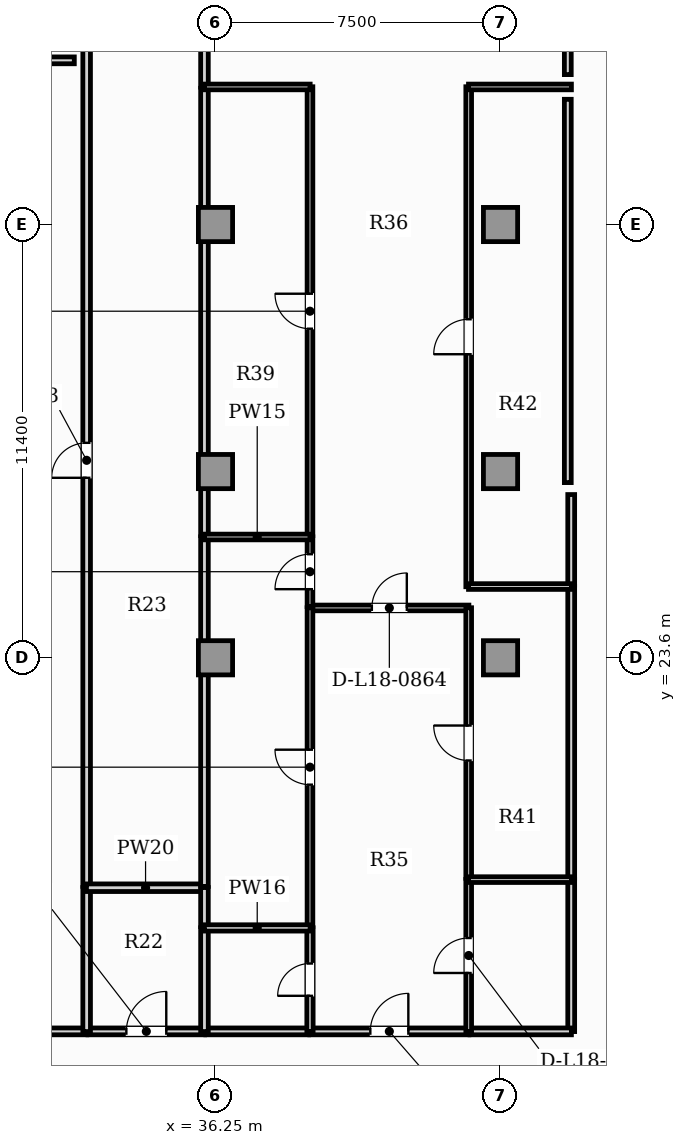
"""IFC4 building model, lengths in metres.
Left out: names, types, materials, properties, quantities, classifications, styles, units other than length and angle.
Written with IfcOpenShell. Run it as: python <this file> out.ifc"""

import sys

from ifc_helpers import new_model, si_unit, direction, frame, frame_2d, origin, origin_2d, place, context, subcontext, project, spatial, rectangle, extrude, element, fill, save


model = new_model("IFC4")
c1 = context("Model", 3, precision=1e-05, world=origin(), true_north=direction((0.0, 1.0)))
c2 = subcontext(c1, "Body", "Model", "MODEL_VIEW")
j1 = project(units=[si_unit("LENGTHUNIT", "METRE"), si_unit("PLANEANGLEUNIT", "RADIAN")], contexts=[c1])
p1 = place(None, origin())
s1 = spatial("IfcSite", under=j1, at=p1, CompositionType="ELEMENT")
p2 = place(p1, origin())
s2 = spatial("IfcBuilding", under=s1, at=p2, CompositionType="ELEMENT")
p3 = place(p2, frame((0.0, 0.0, 76.0)))
s3 = spatial("IfcBuildingStorey", under=s2, at=p3, CompositionType="ELEMENT", Elevation=76.0)
for number, where, z_axis, x_axis in (
    (1, (36.25, 23.6, 0.0), (0.0, 0.0, 1.0), (1.0, 0.0, 0.0)),
    (2, (43.75, 23.6, 0.0), (0.0, 0.0, 1.0), (1.0, 0.0, 0.0)),
    (3, (36.25, 28.5, 0.0), (0.0, 0.0, 1.0), (1.0, 0.0, 0.0)),
    (4, (43.75, 28.5, 0.0), (0.0, 0.0, 1.0), (1.0, 0.0, 0.0)),
    (5, (36.25, 35.0, 0.0), (0.0, 0.0, 1.0), (1.0, 0.0, 0.0)),
    (6, (43.75, 35.0, 0.0), (0.0, 0.0, 1.0), (1.0, 0.0, 0.0)),
):
    element("IfcColumn", number, at=place(p3, frame(where, z_axis=z_axis, x_axis=x_axis)), inside=s3, PredefinedType="COLUMN", context=c2, shape_type="SweptSolid", body=[
        extrude(rectangle(XDim=0.9, YDim=0.9, at=origin_2d()), origin(), (0.0, 0.0, 1.0), 5.05),
    ])
p4 = place(p3, frame((21.535, 13.77, 0.0), z_axis=(0.0, 0.0, 1.0), x_axis=(1.0, 0.0, 0.0)))
e7 = element("IfcWall", 7, at=p4, inside=s3, PredefinedType="PARTITIONING", context=c2, shape_type="SweptSolid", body=[
    extrude(rectangle(XDim=11.33, YDim=0.18, at=frame_2d((5.665, 0.0))), origin(), (0.0, 0.0, 1.0), 4.8),
])
p5 = place(p4, frame((5.165, 0.0, 0.0)))
e8 = element("IfcOpeningElement", 8, at=p5, cuts=e7, PredefinedType="OPENING", context=c2, shape_type="SweptSolid", body=[
    extrude(rectangle(XDim=1.0, YDim=2.15, at=frame_2d((0.5, 1.075))), frame((0.0, 0.1, 0.0), z_axis=(0.0, -1.0, 0.0), x_axis=(1.0, 0.0, 0.0)), (0.0, 0.0, 1.0), 0.2),
])
p6 = place(p3, frame((32.895, 13.77, 0.0), z_axis=(0.0, 0.0, 1.0), x_axis=(1.0, 0.0, 0.0)))
e9 = element("IfcWall", 9, at=p6, inside=s3, PredefinedType="PARTITIONING", context=c2, shape_type="SweptSolid", body=[
    extrude(rectangle(XDim=3.07, YDim=0.18, at=frame_2d((1.535, 0.0))), origin(), (0.0, 0.0, 1.0), 4.8),
])
p7 = place(p6, frame((1.01, 0.0, 0.0)))
e10 = element("IfcOpeningElement", 10, at=p7, cuts=e9, PredefinedType="OPENING", context=c2, shape_type="SweptSolid", body=[
    extrude(rectangle(XDim=1.05, YDim=2.15, at=frame_2d((0.525, 1.075))), frame((0.0, 0.1, 0.0), z_axis=(0.0, -1.0, 0.0), x_axis=(1.0, 0.0, 0.0)), (0.0, 0.0, 1.0), 0.2),
])
p8 = place(p3, frame((38.731, 13.77, 0.0), z_axis=(0.0, 0.0, 1.0), x_axis=(1.0, 0.0, 0.0)))
e11 = element("IfcWall", 11, at=p8, inside=s3, PredefinedType="PARTITIONING", context=c2, shape_type="SweptSolid", body=[
    extrude(rectangle(XDim=4.186, YDim=0.18, at=frame_2d((2.093, 0.0))), origin(), (0.0, 0.0, 1.0), 4.8),
])
p9 = place(p8, frame((1.593, 0.0, 0.0)))
e12 = element("IfcOpeningElement", 12, at=p9, cuts=e11, PredefinedType="OPENING", context=c2, shape_type="SweptSolid", body=[
    extrude(rectangle(XDim=1.0, YDim=2.15, at=frame_2d((0.5, 1.075))), frame((0.0, 0.1, 0.0), z_axis=(0.0, -1.0, 0.0), x_axis=(1.0, 0.0, 0.0)), (0.0, 0.0, 1.0), 0.2),
])
p10 = place(p3, frame((35.995, 13.77, 0.0), z_axis=(0.0, 0.0, 1.0), x_axis=(1.0, 0.0, 0.0)))
e13 = element("IfcWall", 13, at=p10, inside=s3, PredefinedType="PARTITIONING", context=c2, shape_type="SweptSolid", body=[
    extrude(rectangle(XDim=2.706, YDim=0.18, at=frame_2d((1.353, 0.0))), origin(), (0.0, 0.0, 1.0), 4.8),
])
p11 = place(p3, frame((45.61, 13.765, 0.0), z_axis=(0.0, 0.0, 1.0), x_axis=(0.0, 1.0, 0.0)))
e14 = element("IfcWall", 14, at=p11, inside=s3, PredefinedType="PARTITIONING", context=c2, shape_type="SweptSolid", body=[
    extrude(rectangle(XDim=4.003, YDim=0.18, at=frame_2d((2.002, 0.0))), origin(), (0.0, 0.0, 1.0), 4.8),
])
p12 = place(p3, frame((42.948, 13.77, 0.0), z_axis=(0.0, 0.0, 1.0), x_axis=(1.0, 0.0, 0.0)))
e15 = element("IfcWall", 15, at=p12, inside=s3, PredefinedType="PARTITIONING", context=c2, shape_type="SweptSolid", body=[
    extrude(rectangle(XDim=2.667, YDim=0.18, at=frame_2d((1.334, 0.0))), origin(), (0.0, 0.0, 1.0), 4.8),
])
p13 = place(p3, frame((45.61, 17.798, 0.0), z_axis=(0.0, 0.0, 1.0), x_axis=(0.0, 1.0, 0.0)))
e16 = element("IfcWall", 16, at=p13, inside=s3, PredefinedType="PARTITIONING", context=c2, shape_type="SweptSolid", body=[
    extrude(rectangle(XDim=7.681, YDim=0.18, at=frame_2d((3.841, 0.0))), origin(), (0.0, 0.0, 1.0), 4.8),
])
p14 = place(p3, frame((45.61, 25.51, 0.0), z_axis=(0.0, 0.0, 1.0), x_axis=(0.0, 1.0, 0.0)))
e17 = element("IfcWall", 17, at=p14, inside=s3, PredefinedType="PARTITIONING", context=c2, shape_type="SweptSolid", body=[
    extrude(rectangle(XDim=2.385, YDim=0.18, at=frame_2d((1.193, 0.0))), origin(), (0.0, 0.0, 1.0), 4.8),
])
p15 = place(p3, frame((32.86, 13.765, 0.0), z_axis=(0.0, 0.0, 1.0), x_axis=(0.0, 1.0, 0.0)))
e18 = element("IfcWall", 18, at=p15, inside=s3, PredefinedType="PARTITIONING", context=c2, shape_type="SweptSolid", body=[
    extrude(rectangle(XDim=3.79, YDim=0.2, at=frame_2d((1.895, 0.0))), origin(), (0.0, 0.0, 1.0), 4.8),
])
p16 = place(p3, frame((32.86, 17.585, 0.0), z_axis=(0.0, 0.0, 1.0), x_axis=(0.0, 1.0, 0.0)))
e19 = element("IfcWall", 19, at=p16, inside=s3, PredefinedType="PARTITIONING", context=c2, shape_type="SweptSolid", body=[
    extrude(rectangle(XDim=22.422, YDim=0.2, at=frame_2d((11.211, 0.0))), origin(), (0.0, 0.0, 1.0), 4.8),
])
p17 = place(p16, frame((10.751, 0.0, 0.0)))
e20 = element("IfcOpeningElement", 20, at=p17, cuts=e19, PredefinedType="OPENING", context=c2, shape_type="SweptSolid", body=[
    extrude(rectangle(XDim=0.92, YDim=2.1, at=frame_2d((0.46, 1.05))), frame((0.0, 0.11, 0.0), z_axis=(0.0, -1.0, 0.0), x_axis=(1.0, 0.0, 0.0)), (0.0, 0.0, 1.0), 0.22),
])
p18 = place(p3, frame((32.855, 17.55, 0.0), z_axis=(0.0, 0.0, 1.0), x_axis=(1.0, 0.0, 0.0)))
e21 = element("IfcWall", 21, at=p18, inside=s3, PredefinedType="PARTITIONING", context=c2, shape_type="SweptSolid", body=[
    extrude(rectangle(XDim=3.11, YDim=0.2, at=frame_2d((1.555, 0.0))), origin(), (0.0, 0.0, 1.0), 4.8),
])
p19 = place(p3, frame((35.96, 13.765, 0.0), z_axis=(0.0, 0.0, 1.0), x_axis=(0.0, 1.0, 0.0)))
e22 = element("IfcWall", 22, at=p19, inside=s3, PredefinedType="PARTITIONING", context=c2, shape_type="SweptSolid", body=[
    extrude(rectangle(XDim=2.732, YDim=0.2, at=frame_2d((1.366, 0.0))), origin(), (0.0, 0.0, 1.0), 4.8),
])
p20 = place(p3, frame((35.96, 16.527, 0.0), z_axis=(0.0, 0.0, 1.0), x_axis=(0.0, 1.0, 0.0)))
e23 = element("IfcWall", 23, at=p20, inside=s3, PredefinedType="PARTITIONING", context=c2, shape_type="SweptSolid", body=[
    extrude(rectangle(XDim=1.028, YDim=0.2, at=frame_2d((0.514, 0.0))), origin(), (0.0, 0.0, 1.0), 4.8),
])
p21 = place(p3, frame((35.96, 38.615, 0.0), z_axis=(0.0, 0.0, 1.0), x_axis=(0.0, 1.0, 0.0)))
e24 = element("IfcWall", 24, at=p21, inside=s3, PredefinedType="PARTITIONING", context=c2, shape_type="SweptSolid", body=[
    extrude(rectangle(XDim=1.375, YDim=0.2, at=frame_2d((0.688, 0.0))), origin(), (0.0, 0.0, 1.0), 4.8),
])
p22 = place(p3, frame((35.96, 17.585, 0.0), z_axis=(0.0, 0.0, 1.0), x_axis=(0.0, 1.0, 0.0)))
e25 = element("IfcWall", 25, at=p22, inside=s3, PredefinedType="PARTITIONING", context=c2, shape_type="SweptSolid", body=[
    extrude(rectangle(XDim=9.198, YDim=0.2, at=frame_2d((4.599, 0.0))), origin(), (0.0, 0.0, 1.0), 4.8),
])
p23 = place(p3, frame((35.96, 26.813, 0.0), z_axis=(0.0, 0.0, 1.0), x_axis=(0.0, 1.0, 0.0)))
e26 = element("IfcWall", 26, at=p23, inside=s3, PredefinedType="PARTITIONING", context=c2, shape_type="SweptSolid", body=[
    extrude(rectangle(XDim=11.771, YDim=0.2, at=frame_2d((5.886, 0.0))), origin(), (0.0, 0.0, 1.0), 4.8),
])
p24 = place(p3, frame((38.731, 24.912, 0.0), z_axis=(0.0, 0.0, 1.0), x_axis=(1.0, 0.0, 0.0)))
e27 = element("IfcWall", 27, at=p24, inside=s3, PredefinedType="PARTITIONING", context=c2, shape_type="SweptSolid", body=[
    extrude(rectangle(XDim=4.186, YDim=0.15, at=frame_2d((2.093, 0.0))), origin(), (0.0, 0.0, 1.0), 4.8),
])
p25 = place(p24, frame((1.633, 0.0, 0.0)))
e28 = element("IfcOpeningElement", 28, at=p25, cuts=e27, PredefinedType="OPENING", context=c2, shape_type="SweptSolid", body=[
    extrude(rectangle(XDim=0.92, YDim=2.1, at=frame_2d((0.46, 1.05))), frame((0.0, 0.085, 0.0), z_axis=(0.0, -1.0, 0.0), x_axis=(1.0, 0.0, 0.0)), (0.0, 0.0, 1.0), 0.17),
])
p26 = place(p3, frame((38.736, 13.765, 0.0), z_axis=(0.0, 0.0, 1.0), x_axis=(0.0, 1.0, 0.0)))
e29 = element("IfcWall", 29, at=p26, inside=s3, PredefinedType="PLUMBINGWALL", context=c2, shape_type="SweptSolid", body=[
    extrude(rectangle(XDim=2.732, YDim=0.165, at=frame_2d((1.366, 0.0))), origin(), (0.0, 0.0, 1.0), 4.8),
])
p27 = place(p26, frame((0.941, 0.0, 0.0)))
e30 = element("IfcOpeningElement", 30, at=p27, cuts=e29, PredefinedType="OPENING", context=c2, shape_type="SweptSolid", body=[
    extrude(rectangle(XDim=0.85, YDim=2.1, at=frame_2d((0.425, 1.05))), frame((0.0, 0.093, 0.0), z_axis=(0.0, -1.0, 0.0), x_axis=(1.0, 0.0, 0.0)), (0.0, 0.0, 1.0), 0.185),
])
p28 = place(p3, frame((38.736, 16.527, 0.0), z_axis=(0.0, 0.0, 1.0), x_axis=(0.0, 1.0, 0.0)))
e31 = element("IfcWall", 31, at=p28, inside=s3, PredefinedType="PARTITIONING", context=c2, shape_type="SweptSolid", body=[
    extrude(rectangle(XDim=8.39, YDim=0.15, at=frame_2d((4.195, 0.0))), origin(), (0.0, 0.0, 1.0), 4.8),
])
p29 = place(p28, frame((3.735, 0.0, 0.0)))
e32 = element("IfcOpeningElement", 32, at=p29, cuts=e31, PredefinedType="OPENING", context=c2, shape_type="SweptSolid", body=[
    extrude(rectangle(XDim=0.92, YDim=2.1, at=frame_2d((0.46, 1.05))), frame((0.0, 0.085, 0.0), z_axis=(0.0, -1.0, 0.0), x_axis=(1.0, 0.0, 0.0)), (0.0, 0.0, 1.0), 0.17),
])
p30 = place(p3, frame((42.913, 13.765, 0.0), z_axis=(0.0, 0.0, 1.0), x_axis=(0.0, 1.0, 0.0)))
e33 = element("IfcWall", 33, at=p30, inside=s3, PredefinedType="PARTITIONING", context=c2, shape_type="SweptSolid", body=[
    extrude(rectangle(XDim=4.003, YDim=0.15, at=frame_2d((2.002, 0.0))), origin(), (0.0, 0.0, 1.0), 4.8),
])
p31 = place(p30, frame((1.542, 0.0, 0.0)))
e34 = element("IfcOpeningElement", 34, at=p31, cuts=e33, PredefinedType="OPENING", context=c2, shape_type="SweptSolid", body=[
    extrude(rectangle(XDim=0.92, YDim=2.1, at=frame_2d((0.46, 1.05))), frame((0.0, 0.085, 0.0), z_axis=(0.0, -1.0, 0.0), x_axis=(1.0, 0.0, 0.0)), (0.0, 0.0, 1.0), 0.17),
])
p32 = place(p3, frame((42.913, 17.798, 0.0), z_axis=(0.0, 0.0, 1.0), x_axis=(0.0, 1.0, 0.0)))
e35 = element("IfcWall", 35, at=p32, inside=s3, PredefinedType="PARTITIONING", context=c2, shape_type="SweptSolid", body=[
    extrude(rectangle(XDim=7.119, YDim=0.15, at=frame_2d((3.559, 0.0))), origin(), (0.0, 0.0, 1.0), 4.8),
])
p33 = place(p32, frame((3.099, 0.0, 0.0)))
e36 = element("IfcOpeningElement", 36, at=p33, cuts=e35, PredefinedType="OPENING", context=c2, shape_type="SweptSolid", body=[
    extrude(rectangle(XDim=0.92, YDim=2.1, at=frame_2d((0.46, 1.05))), frame((0.0, 0.085, 0.0), z_axis=(0.0, -1.0, 0.0), x_axis=(1.0, 0.0, 0.0)), (0.0, 0.0, 1.0), 0.17),
])
p34 = place(p3, frame((38.736, 24.947, 0.0), z_axis=(0.0, 0.0, 1.0), x_axis=(0.0, 1.0, 0.0)))
e37 = element("IfcWall", 37, at=p34, inside=s3, PredefinedType="PARTITIONING", context=c2, shape_type="SweptSolid", body=[
    extrude(rectangle(XDim=1.836, YDim=0.15, at=frame_2d((0.918, 0.0))), origin(), (0.0, 0.0, 1.0), 4.8),
])
p35 = place(p34, frame((0.458, 0.0, 0.0)))
e38 = element("IfcOpeningElement", 38, at=p35, cuts=e37, PredefinedType="OPENING", context=c2, shape_type="SweptSolid", body=[
    extrude(rectangle(XDim=0.92, YDim=2.1, at=frame_2d((0.46, 1.05))), frame((0.0, 0.085, 0.0), z_axis=(0.0, -1.0, 0.0), x_axis=(1.0, 0.0, 0.0)), (0.0, 0.0, 1.0), 0.17),
])
p36 = place(p3, frame((38.736, 26.813, 0.0), z_axis=(0.0, 0.0, 1.0), x_axis=(0.0, 1.0, 0.0)))
e39 = element("IfcWall", 39, at=p36, inside=s3, PredefinedType="PARTITIONING", context=c2, shape_type="SweptSolid", body=[
    extrude(rectangle(XDim=11.812, YDim=0.15, at=frame_2d((5.906, 0.0))), origin(), (0.0, 0.0, 1.0), 4.8),
])
p37 = place(p36, frame((5.446, 0.0, 0.0)))
e40 = element("IfcOpeningElement", 40, at=p37, cuts=e39, PredefinedType="OPENING", context=c2, shape_type="SweptSolid", body=[
    extrude(rectangle(XDim=0.92, YDim=2.1, at=frame_2d((0.46, 1.05))), frame((0.0, 0.085, 0.0), z_axis=(0.0, -1.0, 0.0), x_axis=(1.0, 0.0, 0.0)), (0.0, 0.0, 1.0), 0.17),
])
p38 = place(p3, frame((35.955, 38.62, 0.0), z_axis=(0.0, 0.0, 1.0), x_axis=(1.0, 0.0, 0.0)))
e41 = element("IfcWall", 41, at=p38, inside=s3, PredefinedType="PARTITIONING", context=c2, shape_type="SweptSolid", body=[
    extrude(rectangle(XDim=2.786, YDim=0.15, at=frame_2d((1.393, 0.0))), origin(), (0.0, 0.0, 1.0), 4.8),
])
p39 = place(p3, frame((42.913, 25.469, 0.0), z_axis=(0.0, 0.0, 1.0), x_axis=(0.0, 1.0, 0.0)))
e42 = element("IfcWall", 42, at=p39, inside=s3, PredefinedType="PARTITIONING", context=c2, shape_type="SweptSolid", body=[
    extrude(rectangle(XDim=13.156, YDim=0.15, at=frame_2d((6.578, 0.0))), origin(), (0.0, 0.0, 1.0), 4.8),
])
p40 = place(p39, frame((6.118, 0.0, 0.0)))
e43 = element("IfcOpeningElement", 43, at=p40, cuts=e42, PredefinedType="OPENING", context=c2, shape_type="SweptSolid", body=[
    extrude(rectangle(XDim=0.92, YDim=2.1, at=frame_2d((0.46, 1.05))), frame((0.0, 0.085, 0.0), z_axis=(0.0, -1.0, 0.0), x_axis=(1.0, 0.0, 0.0)), (0.0, 0.0, 1.0), 0.17),
])
p41 = place(p3, frame((42.907, 38.62, 0.0), z_axis=(0.0, 0.0, 1.0), x_axis=(1.0, 0.0, 0.0)))
e44 = element("IfcWall", 44, at=p41, inside=s3, PredefinedType="PARTITIONING", context=c2, shape_type="SweptSolid", body=[
    extrude(rectangle(XDim=2.708, YDim=0.15, at=frame_2d((1.354, 0.0))), origin(), (0.0, 0.0, 1.0), 4.8),
])
p42 = place(p3, frame((35.955, 16.492, 0.0), z_axis=(0.0, 0.0, 1.0), x_axis=(1.0, 0.0, 0.0)))
e45 = element("IfcWall", 45, at=p42, inside=s3, PredefinedType="PLUMBINGWALL", context=c2, shape_type="SweptSolid", body=[
    extrude(rectangle(XDim=2.786, YDim=0.165, at=frame_2d((1.393, 0.0))), origin(), (0.0, 0.0, 1.0), 4.8),
])
p43 = place(p3, frame((35.955, 26.778, 0.0), z_axis=(0.0, 0.0, 1.0), x_axis=(1.0, 0.0, 0.0)))
e46 = element("IfcWall", 46, at=p43, inside=s3, PredefinedType="PARTITIONING", context=c2, shape_type="SweptSolid", body=[
    extrude(rectangle(XDim=2.786, YDim=0.15, at=frame_2d((1.393, 0.0))), origin(), (0.0, 0.0, 1.0), 4.8),
])
for number, where, z_axis, x_axis in (
    (47, (42.907, 17.763, 0.0), (0.0, 0.0, 1.0), (1.0, 0.0, 0.0)),
    (48, (42.907, 25.475, 0.0), (0.0, 0.0, 1.0), (1.0, 0.0, 0.0)),
):
    element("IfcWall", number, at=place(p3, frame(where, z_axis=z_axis, x_axis=x_axis)), inside=s3, PredefinedType="PARTITIONING", context=c2, shape_type="SweptSolid", body=[
        extrude(rectangle(XDim=2.708, YDim=0.15, at=frame_2d((1.354, 0.0))), origin(), (0.0, 0.0, 1.0), 4.8),
    ])
p44 = place(p3, frame((24.187, 39.32, 0.0), z_axis=(0.0, 0.0, 1.0), x_axis=(1.0, 0.0, 0.0)))
e49 = element("IfcWall", 49, at=p44, inside=s3, PredefinedType="PARTITIONING", context=c2, shape_type="SweptSolid", body=[
    extrude(rectangle(XDim=8.348, YDim=0.18, at=frame_2d((4.174, 0.0))), origin(), (0.0, 0.0, 1.0), 4.8),
])
p45 = place(p3, frame((45.52, 39.795, 0.0), z_axis=(0.0, 0.0, 1.0), x_axis=(0.0, -1.0, 0.0)))
e50 = element("IfcWall", 50, at=p45, inside=s3, PredefinedType="PARTITIONING", context=c2, shape_type="SweptSolid", body=[
    extrude(rectangle(XDim=0.85, YDim=0.18, at=frame_2d((0.425, 0.0))), origin(), (0.0, 0.0, 1.0), 4.8),
])
p46 = place(p3, frame((45.52, 38.295, 0.0), z_axis=(0.0, 0.0, 1.0), x_axis=(0.0, -1.0, 0.0)))
e51 = element("IfcWall", 51, at=p46, inside=s3, PredefinedType="PARTITIONING", context=c2, shape_type="SweptSolid", body=[
    extrude(rectangle(XDim=10.085, YDim=0.18, at=frame_2d((5.042, 0.0))), origin(), (0.0, 0.0, 1.0), 4.8),
])
p47 = place(p7, origin())
e52 = element("IfcDoor", 52, at=p47, inside=s3, OperationType="SINGLE_SWING_RIGHT", PredefinedType="DOOR", context=c2, shape_type="SweptSolid", body=[
    extrude(rectangle(XDim=1.05, YDim=2.15, at=frame_2d((0.525, 1.075))), frame((0.0, 0.025, 0.0), z_axis=(0.0, -1.0, 0.0), x_axis=(1.0, 0.0, 0.0)), (0.0, 0.0, 1.0), 0.05),
])
fill(e10, e52)
p48 = place(p9, origin())
e53 = element("IfcDoor", 53, at=p48, inside=s3, OperationType="SINGLE_SWING_RIGHT", PredefinedType="DOOR", context=c2, shape_type="SweptSolid", body=[
    extrude(rectangle(XDim=1.0, YDim=2.15, at=frame_2d((0.5, 1.075))), frame((0.0, 0.025, 0.0), z_axis=(0.0, -1.0, 0.0), x_axis=(1.0, 0.0, 0.0)), (0.0, 0.0, 1.0), 0.05),
])
fill(e12, e53)
p49 = place(p17, origin())
e54 = element("IfcDoor", 54, at=p49, inside=s3, OperationType="SINGLE_SWING_LEFT", PredefinedType="DOOR", context=c2, shape_type="SweptSolid", body=[
    extrude(rectangle(XDim=0.92, YDim=2.1, at=frame_2d((0.46, 1.05))), frame((0.0, 0.025, 0.0), z_axis=(0.0, -1.0, 0.0), x_axis=(1.0, 0.0, 0.0)), (0.0, 0.0, 1.0), 0.05),
])
fill(e20, e54)
p50 = place(p25, origin())
e55 = element("IfcDoor", 55, at=p50, inside=s3, OperationType="SINGLE_SWING_RIGHT", PredefinedType="DOOR", context=c2, shape_type="SweptSolid", body=[
    extrude(rectangle(XDim=0.92, YDim=2.1, at=frame_2d((0.46, 1.05))), frame((0.0, 0.025, 0.0), z_axis=(0.0, -1.0, 0.0), x_axis=(1.0, 0.0, 0.0)), (0.0, 0.0, 1.0), 0.05),
])
fill(e28, e55)
p51 = place(p27, origin())
e56 = element("IfcDoor", 56, at=p51, inside=s3, OperationType="SINGLE_SWING_LEFT", PredefinedType="DOOR", context=c2, shape_type="SweptSolid", body=[
    extrude(rectangle(XDim=0.85, YDim=2.1, at=frame_2d((0.425, 1.05))), frame((0.0, 0.025, 0.0), z_axis=(0.0, -1.0, 0.0), x_axis=(1.0, 0.0, 0.0)), (0.0, 0.0, 1.0), 0.05),
])
fill(e30, e56)
p52 = place(p29, origin())
e57 = element("IfcDoor", 57, at=p52, inside=s3, OperationType="SINGLE_SWING_RIGHT", PredefinedType="DOOR", context=c2, shape_type="SweptSolid", body=[
    extrude(rectangle(XDim=0.92, YDim=2.1, at=frame_2d((0.46, 1.05))), frame((0.0, 0.025, 0.0), z_axis=(0.0, -1.0, 0.0), x_axis=(1.0, 0.0, 0.0)), (0.0, 0.0, 1.0), 0.05),
])
fill(e32, e57)
p53 = place(p31, origin())
e58 = element("IfcDoor", 58, at=p53, inside=s3, OperationType="SINGLE_SWING_LEFT", PredefinedType="DOOR", context=c2, shape_type="SweptSolid", body=[
    extrude(rectangle(XDim=0.92, YDim=2.1, at=frame_2d((0.46, 1.05))), frame((0.0, 0.025, 0.0), z_axis=(0.0, -1.0, 0.0), x_axis=(1.0, 0.0, 0.0)), (0.0, 0.0, 1.0), 0.05),
])
fill(e34, e58)
p54 = place(p33, origin())
e59 = element("IfcDoor", 59, at=p54, inside=s3, OperationType="SINGLE_SWING_RIGHT", PredefinedType="DOOR", context=c2, shape_type="SweptSolid", body=[
    extrude(rectangle(XDim=0.92, YDim=2.1, at=frame_2d((0.46, 1.05))), frame((0.0, 0.025, 0.0), z_axis=(0.0, -1.0, 0.0), x_axis=(1.0, 0.0, 0.0)), (0.0, 0.0, 1.0), 0.05),
])
fill(e36, e59)
p55 = place(p35, origin())
e60 = element("IfcDoor", 60, at=p55, inside=s3, OperationType="SINGLE_SWING_LEFT", PredefinedType="DOOR", context=c2, shape_type="SweptSolid", body=[
    extrude(rectangle(XDim=0.92, YDim=2.1, at=frame_2d((0.46, 1.05))), frame((0.0, 0.025, 0.0), z_axis=(0.0, -1.0, 0.0), x_axis=(1.0, 0.0, 0.0)), (0.0, 0.0, 1.0), 0.05),
])
fill(e38, e60)
p56 = place(p37, origin())
e61 = element("IfcDoor", 61, at=p56, inside=s3, OperationType="SINGLE_SWING_RIGHT", PredefinedType="DOOR", context=c2, shape_type="SweptSolid", body=[
    extrude(rectangle(XDim=0.92, YDim=2.1, at=frame_2d((0.46, 1.05))), frame((0.0, 0.025, 0.0), z_axis=(0.0, -1.0, 0.0), x_axis=(1.0, 0.0, 0.0)), (0.0, 0.0, 1.0), 0.05),
])
fill(e40, e61)
p57 = place(p40, origin())
e62 = element("IfcDoor", 62, at=p57, inside=s3, OperationType="SINGLE_SWING_LEFT", PredefinedType="DOOR", context=c2, shape_type="SweptSolid", body=[
    extrude(rectangle(XDim=0.92, YDim=2.1, at=frame_2d((0.46, 1.05))), frame((0.0, 0.025, 0.0), z_axis=(0.0, -1.0, 0.0), x_axis=(1.0, 0.0, 0.0)), (0.0, 0.0, 1.0), 0.05),
])
fill(e43, e62)
save(model, sys.argv[1])
